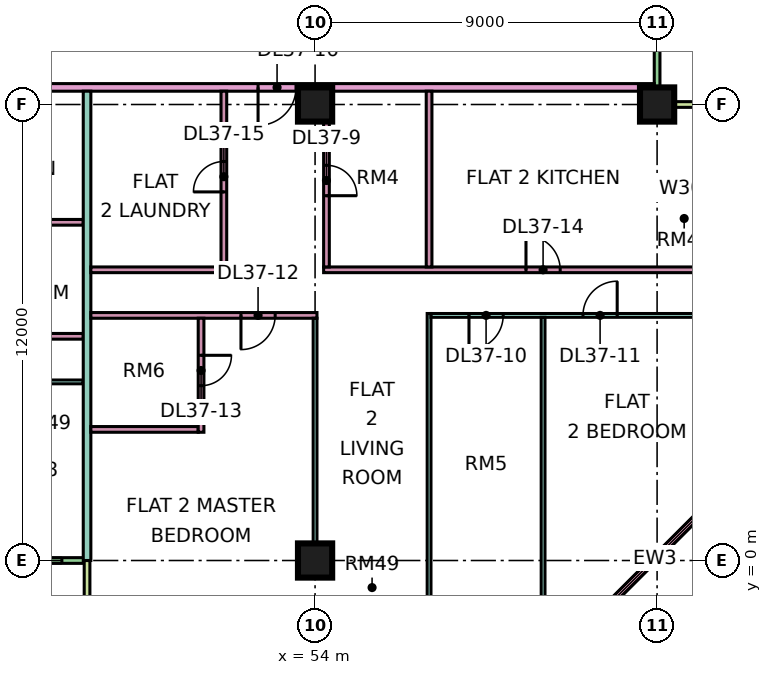
"""IFC4 building model, lengths in metres.
Left out: names, types, materials, properties, quantities, classifications, styles, units other than length and angle.
Written with IfcOpenShell. Run it as: python <this file> out.ifc"""

import sys

from ifc_helpers import new_model, si_unit, direction, frame, frame_2d, origin, origin_2d, place, context, subcontext, project, spatial, rectangle, extrude, element, fill, save


model = new_model("IFC4")
c1 = context("Model", 3, precision=1e-05, world=origin(), true_north=direction((0.0, 1.0)))
c2 = subcontext(c1, "Body", "Model", "MODEL_VIEW")
j1 = project(units=[si_unit("LENGTHUNIT", "METRE"), si_unit("PLANEANGLEUNIT", "RADIAN")], contexts=[c1])
p1 = place(None, origin())
s1 = spatial("IfcSite", under=j1, at=p1, CompositionType="ELEMENT")
p2 = place(p1, origin())
s2 = spatial("IfcBuilding", under=s1, at=p2, CompositionType="ELEMENT")
p3 = place(p2, frame((0.0, 0.0, 164.9)))
s3 = spatial("IfcBuildingStorey", under=s2, at=p3, CompositionType="ELEMENT", Elevation=164.9)
for number, where, z_axis, x_axis in (
    (1, (54.0, 0.0, 0.0), (0.0, 0.0, 1.0), (1.0, 0.0, 0.0)),
    (2, (54.0, 12.0, 0.0), (0.0, 0.0, 1.0), (1.0, 0.0, 0.0)),
    (3, (63.0, 12.0, 0.0), (0.0, 0.0, 1.0), (1.0, 0.0, 0.0)),
):
    element("IfcColumn", number, at=place(p3, frame(where, z_axis=z_axis, x_axis=x_axis)), inside=s3, PredefinedType="COLUMN", context=c2, shape_type="SweptSolid", body=[
        extrude(rectangle(XDim=0.9, YDim=0.9, at=origin_2d()), origin(), (0.0, 0.0, 1.0), 3.75),
    ])
p4 = place(p3, frame((36.075, 0.0, 0.0), z_axis=(0.0, 0.0, 1.0), x_axis=(1.0, 0.0, 0.0)))
e4 = element("IfcWall", 4, at=p4, inside=s3, PredefinedType="SOLIDWALL", context=c2, shape_type="SweptSolid", body=[
    extrude(rectangle(XDim=11.85, YDim=0.15, at=frame_2d((5.925, 0.0))), origin(), (0.0, 0.0, 1.0), 3.35),
])
p5 = place(p4, frame((3.525, 0.0, 0.0)))
e5 = element("IfcOpeningElement", 5, at=p5, cuts=e4, PredefinedType="OPENING", context=c2, shape_type="SweptSolid", body=[
    extrude(rectangle(XDim=1.8, YDim=2.4, at=frame_2d((0.9, 1.2))), frame((0.0, 0.085, 0.0), z_axis=(0.0, -1.0, 0.0), x_axis=(1.0, 0.0, 0.0)), (0.0, 0.0, 1.0), 0.17),
])
p6 = place(p4, frame((10.062, 0.0, 0.45)))
e6 = element("IfcOpeningElement", 6, at=p6, cuts=e4, PredefinedType="OPENING", context=c2, shape_type="SweptSolid", body=[
    extrude(rectangle(XDim=1.2, YDim=2.4, at=frame_2d((0.6, 1.2))), frame((0.0, 0.085, 0.0), z_axis=(0.0, -1.0, 0.0), x_axis=(1.0, 0.0, 0.0)), (0.0, 0.0, 1.0), 0.17),
])
p7 = place(p3, frame((48.0, -1.5, 0.0), z_axis=(0.0, 0.0, 1.0), x_axis=(0.0, 1.0, 0.0)))
e7 = element("IfcWall", 7, at=p7, inside=s3, PredefinedType="SOLIDWALL", context=c2, shape_type="SweptSolid", body=[
    extrude(rectangle(XDim=1.5, YDim=0.15, at=frame_2d((0.75, 0.0))), origin(), (0.0, 0.0, 1.0), 3.35),
])
p8 = place(p3, frame((61.447, -1.447, 0.0), z_axis=(0.0, 0.0, 1.0), x_axis=(0.707106781187, 0.707106781187, 0.0)))
e8 = element("IfcWall", 8, at=p8, inside=s3, PredefinedType="SOLIDWALL", context=c2, shape_type="SweptSolid", body=[
    extrude(rectangle(XDim=4.243, YDim=0.15, at=frame_2d((2.121, 0.0))), origin(), (0.0, 0.0, 1.0), 3.35),
])
p9 = place(p8, frame((0.621, 0.0, 0.45)))
e9 = element("IfcOpeningElement", 9, at=p9, cuts=e8, PredefinedType="OPENING", context=c2, shape_type="SweptSolid", body=[
    extrude(rectangle(XDim=3.0, YDim=2.4, at=frame_2d((1.5, 1.2))), frame((0.0, 0.085, 0.0), z_axis=(0.0, -1.0, 0.0), x_axis=(1.0, 0.0, 0.0)), (0.0, 0.0, 1.0), 0.17),
])
p10 = place(p3, frame((63.0, 12.075, 0.0), z_axis=(0.0, 0.0, 1.0), x_axis=(0.0, 1.0, 0.0)))
e10 = element("IfcWall", 10, at=p10, inside=s3, PredefinedType="SOLIDWALL", context=c2, shape_type="SweptSolid", body=[
    extrude(rectangle(XDim=10.35, YDim=0.15, at=frame_2d((5.175, 0.0))), origin(), (0.0, 0.0, 1.0), 3.35),
])
p11 = place(p10, frame((3.975, 0.0, 0.45)))
e11 = element("IfcOpeningElement", 11, at=p11, cuts=e10, PredefinedType="OPENING", context=c2, shape_type="SweptSolid", body=[
    extrude(rectangle(XDim=2.4, YDim=2.4, at=frame_2d((1.2, 1.2))), frame((0.0, 0.085, 0.0), z_axis=(0.0, -1.0, 0.0), x_axis=(1.0, 0.0, 0.0)), (0.0, 0.0, 1.0), 0.17),
])
p12 = place(p10, frame((8.587, 0.0, 0.45)))
e12 = element("IfcOpeningElement", 12, at=p12, cuts=e10, PredefinedType="OPENING", context=c2, shape_type="SweptSolid", body=[
    extrude(rectangle(XDim=1.2, YDim=2.4, at=frame_2d((0.6, 1.2))), frame((0.0, 0.085, 0.0), z_axis=(0.0, -1.0, 0.0), x_axis=(1.0, 0.0, 0.0)), (0.0, 0.0, 1.0), 0.17),
])
p13 = place(p3, frame((64.5, 12.0, 0.0), z_axis=(0.0, 0.0, 1.0), x_axis=(-1.0, 0.0, 0.0)))
e13 = element("IfcWall", 13, at=p13, inside=s3, PredefinedType="SOLIDWALL", context=c2, shape_type="SweptSolid", body=[
    extrude(rectangle(XDim=1.5, YDim=0.15, at=frame_2d((0.75, 0.0))), origin(), (0.0, 0.0, 1.0), 3.35),
])
p14 = place(p3, frame((33.05, 4.7, 0.0), z_axis=(0.0, 0.0, 1.0), x_axis=(1.0, 0.0, 0.0)))
e14 = element("IfcWall", 14, at=p14, inside=s3, PredefinedType="PARTITIONING", context=c2, shape_type="SweptSolid", body=[
    extrude(rectangle(XDim=14.85, YDim=0.1, at=frame_2d((7.425, 0.0))), origin(), (0.0, 0.0, 1.0), 3.35),
])
p15 = place(p14, frame((1.0, 0.0, 0.0)))
e15 = element("IfcOpeningElement", 15, at=p15, cuts=e14, PredefinedType="OPENING", context=c2, shape_type="SweptSolid", body=[
    extrude(rectangle(XDim=0.9, YDim=2.1, at=frame_2d((0.45, 1.05))), frame((0.0, 0.06, 0.0), z_axis=(0.0, -1.0, 0.0), x_axis=(1.0, 0.0, 0.0)), (0.0, 0.0, 1.0), 0.12),
])
p16 = place(p14, frame((13.0, 0.0, 0.0)))
e16 = element("IfcOpeningElement", 16, at=p16, cuts=e14, PredefinedType="OPENING", context=c2, shape_type="SweptSolid", body=[
    extrude(rectangle(XDim=0.9, YDim=2.1, at=frame_2d((0.45, 1.05))), frame((0.0, 0.06, 0.0), z_axis=(0.0, -1.0, 0.0), x_axis=(1.0, 0.0, 0.0)), (0.0, 0.0, 1.0), 0.12),
])
p17 = place(p14, frame((7.0, 0.0, 0.0)))
e17 = element("IfcOpeningElement", 17, at=p17, cuts=e14, PredefinedType="OPENING", context=c2, shape_type="SweptSolid", body=[
    extrude(rectangle(XDim=0.9, YDim=2.1, at=frame_2d((0.45, 1.05))), frame((0.0, 0.06, 0.0), z_axis=(0.0, -1.0, 0.0), x_axis=(1.0, 0.0, 0.0)), (0.0, 0.0, 1.0), 0.12),
])
p18 = place(p3, frame((40.65, 12.45, 0.0), z_axis=(0.0, 0.0, 1.0), x_axis=(1.0, 0.0, 0.0)))
e18 = element("IfcWall", 18, at=p18, inside=s3, PredefinedType="PARTITIONING", context=c2, shape_type="SweptSolid", body=[
    extrude(rectangle(XDim=22.276, YDim=0.2, at=frame_2d((11.138, 0.0))), origin(), (0.0, 0.0, 1.0), 3.35),
])
p19 = place(p18, frame((11.85, 0.0, 0.0)))
e19 = element("IfcOpeningElement", 19, at=p19, cuts=e18, PredefinedType="OPENING", context=c2, shape_type="SweptSolid", body=[
    extrude(rectangle(XDim=1.0, YDim=2.1, at=frame_2d((0.5, 1.05))), frame((0.0, 0.11, 0.0), z_axis=(0.0, -1.0, 0.0), x_axis=(1.0, 0.0, 0.0)), (0.0, 0.0, 1.0), 0.22),
])
p20 = place(p18, frame((1.05, 0.0, 0.0)))
e20 = element("IfcOpeningElement", 20, at=p20, cuts=e18, PredefinedType="OPENING", context=c2, shape_type="SweptSolid", body=[
    extrude(rectangle(XDim=1.0, YDim=2.1, at=frame_2d((0.5, 1.05))), frame((0.0, 0.11, 0.0), z_axis=(0.0, -1.0, 0.0), x_axis=(1.0, 0.0, 0.0)), (0.0, 0.0, 1.0), 0.22),
])
p21 = place(p3, frame((43.725, 5.9, 0.0), z_axis=(0.0, 0.0, 1.0), x_axis=(1.0, 0.0, 0.0)))
e21 = element("IfcWall", 21, at=p21, inside=s3, PredefinedType="PARTITIONING", context=c2, shape_type="SweptSolid", body=[
    extrude(rectangle(XDim=4.175, YDim=0.15, at=frame_2d((2.087, 0.0))), origin(), (0.0, 0.0, 1.0), 3.35),
])
p22 = place(p21, frame((1.675, 0.0, 0.0)))
e22 = element("IfcOpeningElement", 22, at=p22, cuts=e21, PredefinedType="OPENING", context=c2, shape_type="SweptSolid", body=[
    extrude(rectangle(XDim=0.8, YDim=2.1, at=frame_2d((0.4, 1.05))), frame((0.0, 0.085, 0.0), z_axis=(0.0, -1.0, 0.0), x_axis=(1.0, 0.0, 0.0)), (0.0, 0.0, 1.0), 0.17),
])
p23 = place(p3, frame((43.725, 8.9, 0.0), z_axis=(0.0, 0.0, 1.0), x_axis=(1.0, 0.0, 0.0)))
e23 = element("IfcWall", 23, at=p23, inside=s3, PredefinedType="PARTITIONING", context=c2, shape_type="SweptSolid", body=[
    extrude(rectangle(XDim=4.175, YDim=0.15, at=frame_2d((2.087, 0.0))), origin(), (0.0, 0.0, 1.0), 3.35),
])
p24 = place(p3, frame((48.0, 0.0, 0.0), z_axis=(0.0, 0.0, 1.0), x_axis=(0.0, 1.0, 0.0)))
e24 = element("IfcWall", 24, at=p24, inside=s3, PredefinedType="PARTITIONING", context=c2, shape_type="SweptSolid", body=[
    extrude(rectangle(XDim=12.35, YDim=0.2, at=frame_2d((6.175, 0.0))), origin(), (0.0, 0.0, 1.0), 3.35),
])
p25 = place(p3, frame((48.1, 3.45, 0.0), z_axis=(0.0, 0.0, 1.0), x_axis=(1.0, 0.0, 0.0)))
e25 = element("IfcWall", 25, at=p25, inside=s3, PredefinedType="PARTITIONING", context=c2, shape_type="SweptSolid", body=[
    extrude(rectangle(XDim=2.825, YDim=0.15, at=frame_2d((1.413, 0.0))), origin(), (0.0, 0.0, 1.0), 3.35),
])
p26 = place(p3, frame((48.1, 6.45, 0.0), z_axis=(0.0, 0.0, 1.0), x_axis=(1.0, 0.0, 0.0)))
e26 = element("IfcWall", 26, at=p26, inside=s3, PredefinedType="PARTITIONING", context=c2, shape_type="SweptSolid", body=[
    extrude(rectangle(XDim=5.95, YDim=0.15, at=frame_2d((2.975, 0.0))), origin(), (0.0, 0.0, 1.0), 3.35),
])
p27 = place(p26, frame((3.95, 0.0, 0.0)))
e27 = element("IfcOpeningElement", 27, at=p27, cuts=e26, PredefinedType="OPENING", context=c2, shape_type="SweptSolid", body=[
    extrude(rectangle(XDim=0.9, YDim=2.1, at=frame_2d((0.45, 1.05))), frame((0.0, 0.085, 0.0), z_axis=(0.0, -1.0, 0.0), x_axis=(1.0, 0.0, 0.0)), (0.0, 0.0, 1.0), 0.17),
])
p28 = place(p3, frame((48.1, 7.65, 0.0), z_axis=(0.0, 0.0, 1.0), x_axis=(1.0, 0.0, 0.0)))
e28 = element("IfcWall", 28, at=p28, inside=s3, PredefinedType="PARTITIONING", context=c2, shape_type="SweptSolid", body=[
    extrude(rectangle(XDim=3.425, YDim=0.15, at=frame_2d((1.712, 0.0))), origin(), (0.0, 0.0, 1.0), 3.35),
])
p29 = place(p3, frame((51.0, 3.375, 0.0), z_axis=(0.0, 0.0, 1.0), x_axis=(0.0, 1.0, 0.0)))
e29 = element("IfcWall", 29, at=p29, inside=s3, PredefinedType="PARTITIONING", context=c2, shape_type="SweptSolid", body=[
    extrude(rectangle(XDim=3.0, YDim=0.15, at=frame_2d((1.5, 0.0))), origin(), (0.0, 0.0, 1.0), 3.35),
])
p30 = place(p29, frame((1.225, 0.0, 0.0)))
e30 = element("IfcOpeningElement", 30, at=p30, cuts=e29, PredefinedType="OPENING", context=c2, shape_type="SweptSolid", body=[
    extrude(rectangle(XDim=0.8, YDim=2.1, at=frame_2d((0.4, 1.05))), frame((0.0, 0.085, 0.0), z_axis=(0.0, -1.0, 0.0), x_axis=(1.0, 0.0, 0.0)), (0.0, 0.0, 1.0), 0.17),
])
p31 = place(p3, frame((51.6, 7.575, 0.0), z_axis=(0.0, 0.0, 1.0), x_axis=(0.0, 1.0, 0.0)))
e31 = element("IfcWall", 31, at=p31, inside=s3, PredefinedType="PARTITIONING", context=c2, shape_type="SweptSolid", body=[
    extrude(rectangle(XDim=4.775, YDim=0.15, at=frame_2d((2.388, 0.0))), origin(), (0.0, 0.0, 1.0), 3.35),
])
p32 = place(p31, frame((2.125, 0.0, 0.0)))
e32 = element("IfcOpeningElement", 32, at=p32, cuts=e31, PredefinedType="OPENING", context=c2, shape_type="SweptSolid", body=[
    extrude(rectangle(XDim=0.8, YDim=2.1, at=frame_2d((0.4, 1.05))), frame((0.0, 0.085, 0.0), z_axis=(0.0, -1.0, 0.0), x_axis=(1.0, 0.0, 0.0)), (0.0, 0.0, 1.0), 0.17),
])
p33 = place(p3, frame((54.0, 0.0, 0.0), z_axis=(0.0, 0.0, 1.0), x_axis=(0.0, 1.0, 0.0)))
e33 = element("IfcWall", 33, at=p33, inside=s3, PredefinedType="PARTITIONING", context=c2, shape_type="SweptSolid", body=[
    extrude(rectangle(XDim=6.375, YDim=0.1, at=frame_2d((3.188, 0.0))), origin(), (0.0, 0.0, 1.0), 3.35),
])
p34 = place(p3, frame((54.225, 7.65, 0.0), z_axis=(0.0, 0.0, 1.0), x_axis=(1.0, 0.0, 0.0)))
e34 = element("IfcWall", 34, at=p34, inside=s3, PredefinedType="PARTITIONING", context=c2, shape_type="SweptSolid", body=[
    extrude(rectangle(XDim=10.125, YDim=0.15, at=frame_2d((5.062, 0.0))), origin(), (0.0, 0.0, 1.0), 3.35),
])
p35 = place(p34, frame((5.325, 0.0, 0.0)))
e35 = element("IfcOpeningElement", 35, at=p35, cuts=e34, PredefinedType="OPENING", context=c2, shape_type="SweptSolid", body=[
    extrude(rectangle(XDim=0.9, YDim=2.1, at=frame_2d((0.45, 1.05))), frame((0.0, 0.085, 0.0), z_axis=(0.0, -1.0, 0.0), x_axis=(1.0, 0.0, 0.0)), (0.0, 0.0, 1.0), 0.17),
])
p36 = place(p3, frame((54.3, 7.725, 0.0), z_axis=(0.0, 0.0, 1.0), x_axis=(0.0, 1.0, 0.0)))
e36 = element("IfcWall", 36, at=p36, inside=s3, PredefinedType="PARTITIONING", context=c2, shape_type="SweptSolid", body=[
    extrude(rectangle(XDim=4.625, YDim=0.15, at=frame_2d((2.312, 0.0))), origin(), (0.0, 0.0, 1.0), 3.35),
])
p37 = place(p36, frame((1.875, 0.0, 0.0)))
e37 = element("IfcOpeningElement", 37, at=p37, cuts=e36, PredefinedType="OPENING", context=c2, shape_type="SweptSolid", body=[
    extrude(rectangle(XDim=0.8, YDim=2.1, at=frame_2d((0.4, 1.05))), frame((0.0, 0.085, 0.0), z_axis=(0.0, -1.0, 0.0), x_axis=(1.0, 0.0, 0.0)), (0.0, 0.0, 1.0), 0.17),
])
p38 = place(p3, frame((57.0, -1.35, 0.0), z_axis=(0.0, 0.0, 1.0), x_axis=(0.0, 1.0, 0.0)))
e38 = element("IfcWall", 38, at=p38, inside=s3, PredefinedType="PARTITIONING", context=c2, shape_type="SweptSolid", body=[
    extrude(rectangle(XDim=7.85, YDim=0.1, at=frame_2d((3.925, 0.0))), origin(), (0.0, 0.0, 1.0), 3.35),
])
p39 = place(p3, frame((57.0, 7.725, 0.0), z_axis=(0.0, 0.0, 1.0), x_axis=(0.0, 1.0, 0.0)))
e39 = element("IfcWall", 39, at=p39, inside=s3, PredefinedType="PARTITIONING", context=c2, shape_type="SweptSolid", body=[
    extrude(rectangle(XDim=4.625, YDim=0.15, at=frame_2d((2.312, 0.0))), origin(), (0.0, 0.0, 1.0), 3.35),
])
p40 = place(p3, frame((57.05, 6.45, 0.0), z_axis=(0.0, 0.0, 1.0), x_axis=(1.0, 0.0, 0.0)))
e40 = element("IfcWall", 40, at=p40, inside=s3, PredefinedType="PARTITIONING", context=c2, shape_type="SweptSolid", body=[
    extrude(rectangle(XDim=7.3, YDim=0.1, at=frame_2d((3.65, 0.0))), origin(), (0.0, 0.0, 1.0), 3.35),
])
p41 = place(p40, frame((1.0, 0.0, 0.0)))
e41 = element("IfcOpeningElement", 41, at=p41, cuts=e40, PredefinedType="OPENING", context=c2, shape_type="SweptSolid", body=[
    extrude(rectangle(XDim=0.9, YDim=2.1, at=frame_2d((0.45, 1.05))), frame((0.0, 0.06, 0.0), z_axis=(0.0, -1.0, 0.0), x_axis=(1.0, 0.0, 0.0)), (0.0, 0.0, 1.0), 0.12),
])
p42 = place(p40, frame((4.0, 0.0, 0.0)))
e42 = element("IfcOpeningElement", 42, at=p42, cuts=e40, PredefinedType="OPENING", context=c2, shape_type="SweptSolid", body=[
    extrude(rectangle(XDim=0.9, YDim=2.1, at=frame_2d((0.45, 1.05))), frame((0.0, 0.06, 0.0), z_axis=(0.0, -1.0, 0.0), x_axis=(1.0, 0.0, 0.0)), (0.0, 0.0, 1.0), 0.12),
])
p43 = place(p3, frame((60.0, -1.351, 0.0), z_axis=(0.0, 0.0, 1.0), x_axis=(0.0, 1.0, 0.0)))
e43 = element("IfcWall", 43, at=p43, inside=s3, PredefinedType="PARTITIONING", context=c2, shape_type="SweptSolid", body=[
    extrude(rectangle(XDim=7.751, YDim=0.1, at=frame_2d((3.875, 0.0))), origin(), (0.0, 0.0, 1.0), 3.35),
])
p44 = place(p6, origin())
e44 = element("IfcWindow", 44, at=p44, inside=s3, PartitioningType="SINGLE_PANEL", PredefinedType="WINDOW", context=c2, shape_type="SweptSolid", body=[
    extrude(rectangle(XDim=1.2, YDim=2.4, at=frame_2d((0.6, 1.2))), frame((0.0, 0.03, 0.0), z_axis=(0.0, -1.0, 0.0), x_axis=(1.0, 0.0, 0.0)), (0.0, 0.0, 1.0), 0.06),
])
fill(e6, e44)
p45 = place(p9, origin())
e45 = element("IfcWindow", 45, at=p45, inside=s3, PartitioningType="SINGLE_PANEL", PredefinedType="WINDOW", context=c2, shape_type="SweptSolid", body=[
    extrude(rectangle(XDim=3.0, YDim=2.4, at=frame_2d((1.5, 1.2))), frame((0.0, 0.03, 0.0), z_axis=(0.0, -1.0, 0.0), x_axis=(1.0, 0.0, 0.0)), (0.0, 0.0, 1.0), 0.06),
])
fill(e9, e45)
p46 = place(p37, frame((0.8, 0.0, 0.0), z_axis=(0.0, 0.0, 1.0), x_axis=(-1.0, 0.0, 0.0)))
e46 = element("IfcDoor", 46, at=p46, inside=s3, OperationType="SINGLE_SWING_LEFT", PredefinedType="DOOR", context=c2, shape_type="SweptSolid", body=[
    extrude(rectangle(XDim=0.8, YDim=2.1, at=frame_2d((0.4, 1.05))), frame((0.0, 0.025, 0.0), z_axis=(0.0, -1.0, 0.0), x_axis=(1.0, 0.0, 0.0)), (0.0, 0.0, 1.0), 0.05),
])
fill(e37, e46)
p47 = place(p41, frame((0.9, 0.0, 0.0), z_axis=(0.0, 0.0, 1.0), x_axis=(-1.0, 0.0, 0.0)))
e47 = element("IfcDoor", 47, at=p47, inside=s3, OperationType="SINGLE_SWING_LEFT", PredefinedType="DOOR", context=c2, shape_type="SweptSolid", body=[
    extrude(rectangle(XDim=0.9, YDim=2.1, at=frame_2d((0.45, 1.05))), frame((0.0, 0.025, 0.0), z_axis=(0.0, -1.0, 0.0), x_axis=(1.0, 0.0, 0.0)), (0.0, 0.0, 1.0), 0.05),
])
fill(e41, e47)
p48 = place(p42, frame((0.9, 0.0, 0.0), z_axis=(0.0, 0.0, 1.0), x_axis=(-1.0, 0.0, 0.0)))
e48 = element("IfcDoor", 48, at=p48, inside=s3, OperationType="SINGLE_SWING_RIGHT", PredefinedType="DOOR", context=c2, shape_type="SweptSolid", body=[
    extrude(rectangle(XDim=0.9, YDim=2.1, at=frame_2d((0.45, 1.05))), frame((0.0, 0.025, 0.0), z_axis=(0.0, -1.0, 0.0), x_axis=(1.0, 0.0, 0.0)), (0.0, 0.0, 1.0), 0.05),
])
fill(e42, e48)
p49 = place(p27, frame((0.9, 0.0, 0.0), z_axis=(0.0, 0.0, 1.0), x_axis=(-1.0, 0.0, 0.0)))
e49 = element("IfcDoor", 49, at=p49, inside=s3, OperationType="SINGLE_SWING_LEFT", PredefinedType="DOOR", context=c2, shape_type="SweptSolid", body=[
    extrude(rectangle(XDim=0.9, YDim=2.1, at=frame_2d((0.45, 1.05))), frame((0.0, 0.025, 0.0), z_axis=(0.0, -1.0, 0.0), x_axis=(1.0, 0.0, 0.0)), (0.0, 0.0, 1.0), 0.05),
])
fill(e27, e49)
p50 = place(p30, origin())
e50 = element("IfcDoor", 50, at=p50, inside=s3, OperationType="SINGLE_SWING_RIGHT", PredefinedType="DOOR", context=c2, shape_type="SweptSolid", body=[
    extrude(rectangle(XDim=0.8, YDim=2.1, at=frame_2d((0.4, 1.05))), frame((0.0, 0.025, 0.0), z_axis=(0.0, -1.0, 0.0), x_axis=(1.0, 0.0, 0.0)), (0.0, 0.0, 1.0), 0.05),
])
fill(e30, e50)
p51 = place(p35, origin())
e51 = element("IfcDoor", 51, at=p51, inside=s3, OperationType="SINGLE_SWING_LEFT", PredefinedType="DOOR", context=c2, shape_type="SweptSolid", body=[
    extrude(rectangle(XDim=0.9, YDim=2.1, at=frame_2d((0.45, 1.05))), frame((0.0, 0.025, 0.0), z_axis=(0.0, -1.0, 0.0), x_axis=(1.0, 0.0, 0.0)), (0.0, 0.0, 1.0), 0.05),
])
fill(e35, e51)
p52 = place(p32, origin())
e52 = element("IfcDoor", 52, at=p52, inside=s3, OperationType="SINGLE_SWING_LEFT", PredefinedType="DOOR", context=c2, shape_type="SweptSolid", body=[
    extrude(rectangle(XDim=0.8, YDim=2.1, at=frame_2d((0.4, 1.05))), frame((0.0, 0.025, 0.0), z_axis=(0.0, -1.0, 0.0), x_axis=(1.0, 0.0, 0.0)), (0.0, 0.0, 1.0), 0.05),
])
fill(e32, e52)
p53 = place(p19, frame((1.0, 0.0, 0.0), z_axis=(0.0, 0.0, 1.0), x_axis=(-1.0, 0.0, 0.0)))
e53 = element("IfcDoor", 53, at=p53, inside=s3, OperationType="SINGLE_SWING_LEFT", PredefinedType="DOOR", context=c2, shape_type="SweptSolid", body=[
    extrude(rectangle(XDim=1.0, YDim=2.1, at=frame_2d((0.5, 1.05))), frame((0.0, 0.025, 0.0), z_axis=(0.0, -1.0, 0.0), x_axis=(1.0, 0.0, 0.0)), (0.0, 0.0, 1.0), 0.05),
])
fill(e19, e53)
save(model, sys.argv[1])
